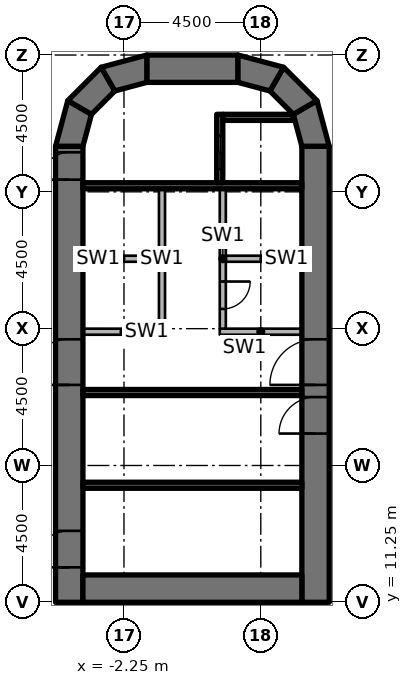
"""IFC4 building model, lengths in metres.
Left out: names, types, materials, properties, quantities, classifications, styles, units other than length and angle.
Written with IfcOpenShell. Run it as: python <this file> out.ifc"""

import sys

from ifc_helpers import new_model, si_unit, direction, frame, frame_2d, origin, place, context, subcontext, project, spatial, polyline, rectangle, outline, extrude, element, fill, save


model = new_model("IFC4")
c1 = context("Model", 3, precision=1e-05, world=origin(), true_north=direction((0.0, 1.0)))
c2 = subcontext(c1, "Body", "Model", "MODEL_VIEW")
j1 = project(units=[si_unit("LENGTHUNIT", "METRE"), si_unit("PLANEANGLEUNIT", "RADIAN")], contexts=[c1])
p1 = place(None, origin())
s1 = spatial("IfcSite", under=j1, at=p1, CompositionType="ELEMENT")
p2 = place(p1, origin())
s2 = spatial("IfcBuilding", under=s1, at=p2, CompositionType="ELEMENT")
p3 = place(p2, frame((0.0, 0.0, -4.0)))
s3 = spatial("IfcBuildingStorey", under=s2, at=p3, CompositionType="ELEMENT", Elevation=-4.0)
p4 = place(p3, frame((-4.05, 11.25, 0.0), z_axis=(0.0, 0.0, 1.0), x_axis=(0.0, 1.0, 0.0)))
e1 = element("IfcWall", 1, at=p4, inside=s3, PredefinedType="SHEAR", context=c2, shape_type="SweptSolid", body=[
    extrude(rectangle(XDim=15.0, YDim=0.9, at=frame_2d((7.5, 0.0))), origin(), (0.0, 0.0, 1.0), 4.0),
])
p5 = place(p4, frame((7.15, 0.0, 0.0)))
e2 = element("IfcOpeningElement", 2, at=p5, cuts=e1, PredefinedType="OPENING", context=c2, shape_type="SweptSolid", body=[
    extrude(rectangle(XDim=1.5, YDim=2.3, at=frame_2d((0.75, 1.15))), frame((0.0, 0.46, 0.0), z_axis=(0.0, -1.0, 0.0), x_axis=(1.0, 0.0, 0.0)), (0.0, 0.0, 1.0), 0.92),
])
p6 = place(p4, frame((13.9, 0.0, 0.0)))
e3 = element("IfcOpeningElement", 3, at=p6, cuts=e1, PredefinedType="OPENING", context=c2, shape_type="SweptSolid", body=[
    extrude(rectangle(XDim=0.9, YDim=2.1, at=frame_2d((0.45, 1.05))), frame((0.0, 0.46, 0.0), z_axis=(0.0, -1.0, 0.0), x_axis=(1.0, 0.0, 0.0)), (0.0, 0.0, 1.0), 0.92),
])
p7 = place(p4, frame((1.15, 0.0, 0.0)))
e4 = element("IfcOpeningElement", 4, at=p7, cuts=e1, PredefinedType="OPENING", context=c2, shape_type="SweptSolid", body=[
    extrude(rectangle(XDim=1.2, YDim=2.1, at=frame_2d((0.6, 1.05))), frame((0.0, 0.46, 0.0), z_axis=(0.0, -1.0, 0.0), x_axis=(1.0, 0.0, 0.0)), (0.0, 0.0, 1.0), 0.92),
])
p8 = place(p3, frame((4.05, 11.25, 0.0), z_axis=(0.0, 0.0, 1.0), x_axis=(0.0, 1.0, 0.0)))
e5 = element("IfcWall", 5, at=p8, inside=s3, PredefinedType="SHEAR", context=c2, shape_type="SweptSolid", body=[
    extrude(rectangle(XDim=15.0, YDim=0.9, at=frame_2d((7.5, 0.0))), origin(), (0.0, 0.0, 1.0), 4.0),
])
p9 = place(p8, frame((7.15, 0.0, 0.0)))
e6 = element("IfcOpeningElement", 6, at=p9, cuts=e5, PredefinedType="OPENING", context=c2, shape_type="SweptSolid", body=[
    extrude(rectangle(XDim=1.5, YDim=2.3, at=frame_2d((0.75, 1.15))), frame((0.0, 0.46, 0.0), z_axis=(0.0, -1.0, 0.0), x_axis=(1.0, 0.0, 0.0)), (0.0, 0.0, 1.0), 0.92),
])
p10 = place(p8, frame((5.55, 0.0, 0.0)))
e7 = element("IfcOpeningElement", 7, at=p10, cuts=e5, PredefinedType="OPENING", context=c2, shape_type="SweptSolid", body=[
    extrude(rectangle(XDim=1.2, YDim=2.1, at=frame_2d((0.6, 1.05))), frame((0.0, 0.46, 0.0), z_axis=(0.0, -1.0, 0.0), x_axis=(1.0, 0.0, 0.0)), (0.0, 0.0, 1.0), 0.92),
])
p11 = place(p3, frame((-3.6, 11.7, 0.0), z_axis=(0.0, 0.0, 1.0), x_axis=(1.0, 0.0, 0.0)))
e8 = element("IfcWall", 8, at=p11, inside=s3, PredefinedType="SHEAR", context=c2, shape_type="SweptSolid", body=[
    extrude(rectangle(XDim=7.2, YDim=0.9, at=frame_2d((3.6, 0.0))), origin(), (0.0, 0.0, 1.0), 4.0),
])
p12 = place(p3, frame((-1.5, 28.8, 0.0), z_axis=(0.0, 0.0, 1.0), x_axis=(1.0, 0.0, 0.0)))
e9 = element("IfcWall", 9, at=p12, inside=s3, PredefinedType="SHEAR", context=c2, shape_type="SweptSolid", body=[
    extrude(rectangle(XDim=3.0, YDim=0.9, at=frame_2d((1.5, 0.0))), origin(), (0.0, 0.0, 1.0), 4.0),
])
p13 = place(p3, origin())
e10 = element("IfcWall", 10, at=p13, inside=s3, PredefinedType="SHEAR", context=c2, shape_type="SweptSolid", body=[
    extrude(outline(polyline([(-4.5, 26.25), (-4.098, 27.75), (-3.319, 27.3), (-3.6, 26.25), (-4.5, 26.25)])), origin(), (0.0, 0.0, 1.0), 4.0),
])
p14 = place(p3, origin())
e11 = element("IfcWall", 11, at=p14, inside=s3, PredefinedType="SHEAR", context=c2, shape_type="SweptSolid", body=[
    extrude(outline(polyline([(-4.098, 27.75), (-3.0, 28.848), (-2.55, 28.069), (-3.319, 27.3), (-4.098, 27.75)])), origin(), (0.0, 0.0, 1.0), 4.0),
])
p15 = place(p3, origin())
e12 = element("IfcWall", 12, at=p15, inside=s3, PredefinedType="SHEAR", context=c2, shape_type="SweptSolid", body=[
    extrude(outline(polyline([(-3.0, 28.848), (-1.5, 29.25), (-1.5, 28.35), (-2.55, 28.069), (-3.0, 28.848)])), origin(), (0.0, 0.0, 1.0), 4.0),
])
p16 = place(p3, origin())
e13 = element("IfcWall", 13, at=p16, inside=s3, PredefinedType="SHEAR", context=c2, shape_type="SweptSolid", body=[
    extrude(outline(polyline([(4.5, 26.25), (4.098, 27.75), (3.319, 27.3), (3.6, 26.25), (4.5, 26.25)])), origin(), (0.0, 0.0, 1.0), 4.0),
])
p17 = place(p3, origin())
e14 = element("IfcWall", 14, at=p17, inside=s3, PredefinedType="SHEAR", context=c2, shape_type="SweptSolid", body=[
    extrude(outline(polyline([(4.098, 27.75), (3.0, 28.848), (2.55, 28.069), (3.319, 27.3), (4.098, 27.75)])), origin(), (0.0, 0.0, 1.0), 4.0),
])
p18 = place(p3, origin())
e15 = element("IfcWall", 15, at=p18, inside=s3, PredefinedType="SHEAR", context=c2, shape_type="SweptSolid", body=[
    extrude(outline(polyline([(3.0, 28.848), (1.5, 29.25), (1.5, 28.35), (2.55, 28.069), (3.0, 28.848)])), origin(), (0.0, 0.0, 1.0), 4.0),
])
p19 = place(p3, frame((-3.6, 24.95, 0.0), z_axis=(0.0, 0.0, 1.0), x_axis=(1.0, 0.0, 0.0)))
e16 = element("IfcWall", 16, at=p19, inside=s3, PredefinedType="SHEAR", context=c2, shape_type="SweptSolid", body=[
    extrude(rectangle(XDim=7.2, YDim=0.2, at=frame_2d((3.6, 0.0))), origin(), (0.0, 0.0, 1.0), 3.1),
])
p20 = place(p3, frame((0.9, 27.3, 0.0), z_axis=(0.0, 0.0, 1.0), x_axis=(0.0, -1.0, 0.0)))
e17 = element("IfcWall", 17, at=p20, inside=s3, PredefinedType="SHEAR", context=c2, shape_type="SweptSolid", body=[
    extrude(rectangle(XDim=2.25, YDim=0.2, at=frame_2d((1.125, 0.0))), origin(), (0.0, 0.0, 1.0), 3.1),
])
p21 = place(p20, frame((0.7, 0.0, 0.0)))
e18 = element("IfcOpeningElement", 18, at=p21, cuts=e17, PredefinedType="OPENING", context=c2, shape_type="SweptSolid", body=[
    extrude(rectangle(XDim=1.1, YDim=2.3, at=frame_2d((0.55, 1.15))), frame((0.0, 0.11, 0.0), z_axis=(0.0, -1.0, 0.0), x_axis=(1.0, 0.0, 0.0)), (0.0, 0.0, 1.0), 0.22),
])
p22 = place(p3, origin())
e19 = element("IfcWall", 19, at=p22, inside=s3, PredefinedType="SHEAR", context=c2, shape_type="SweptSolid", body=[
    extrude(outline(polyline([(1.0, 27.1), (3.341, 27.1), (3.291, 27.284), (3.275, 27.3), (1.0, 27.3), (1.0, 27.1)])), origin(), (0.0, 0.0, 1.0), 3.1),
])
for number, where, z_axis, x_axis in (
    (20, (-3.6, 18.15, 0.0), (0.0, 0.0, 1.0), (1.0, 0.0, 0.0)),
    (21, (-3.6, 15.1, 0.0), (0.0, 0.0, 1.0), (1.0, 0.0, 0.0)),
):
    element("IfcWall", number, at=place(p3, frame(where, z_axis=z_axis, x_axis=x_axis)), inside=s3, PredefinedType="SHEAR", context=c2, shape_type="SweptSolid", body=[
        extrude(rectangle(XDim=7.2, YDim=0.2, at=frame_2d((3.6, 0.0))), origin(), (0.0, 0.0, 1.0), 3.1),
    ])
p23 = place(p3, frame((-3.6, 20.15, 0.0), z_axis=(0.0, 0.0, 1.0), x_axis=(1.0, 0.0, 0.0)))
e22 = element("IfcWall", 22, at=p23, inside=s3, PredefinedType="PARTITIONING", context=c2, shape_type="SweptSolid", body=[
    extrude(rectangle(XDim=2.7, YDim=0.2, at=frame_2d((1.35, 0.0))), origin(), (0.0, 0.0, 1.0), 3.1),
])
p24 = place(p3, frame((-1.0, 24.85, 0.0), z_axis=(0.0, 0.0, 1.0), x_axis=(0.0, -1.0, 0.0)))
e23 = element("IfcWall", 23, at=p24, inside=s3, PredefinedType="PARTITIONING", context=c2, shape_type="SweptSolid", body=[
    extrude(rectangle(XDim=4.6, YDim=0.2, at=frame_2d((2.3, 0.0))), origin(), (0.0, 0.0, 1.0), 3.1),
])
p25 = place(p3, frame((0.9, 20.15, 0.0), z_axis=(0.0, 0.0, 1.0), x_axis=(1.0, 0.0, 0.0)))
e24 = element("IfcWall", 24, at=p25, inside=s3, PredefinedType="PARTITIONING", context=c2, shape_type="SweptSolid", body=[
    extrude(rectangle(XDim=2.7, YDim=0.2, at=frame_2d((1.35, 0.0))), origin(), (0.0, 0.0, 1.0), 3.1),
])
p26 = place(p3, frame((1.0, 24.85, 0.0), z_axis=(0.0, 0.0, 1.0), x_axis=(0.0, -1.0, 0.0)))
e25 = element("IfcWall", 25, at=p26, inside=s3, PredefinedType="PARTITIONING", context=c2, shape_type="SweptSolid", body=[
    extrude(rectangle(XDim=4.6, YDim=0.2, at=frame_2d((2.3, 0.0))), origin(), (0.0, 0.0, 1.0), 3.1),
])
p27 = place(p26, frame((3.05, 0.0, 0.0)))
e26 = element("IfcOpeningElement", 26, at=p27, cuts=e25, PredefinedType="OPENING", context=c2, shape_type="SweptSolid", body=[
    extrude(rectangle(XDim=0.9, YDim=2.1, at=frame_2d((0.45, 1.05))), frame((0.0, 0.11, 0.0), z_axis=(0.0, -1.0, 0.0), x_axis=(1.0, 0.0, 0.0)), (0.0, 0.0, 1.0), 0.22),
])
for number, where, z_axis, x_axis in (
    (27, (-3.6, 22.55, 0.0), (0.0, 0.0, 1.0), (1.0, 0.0, 0.0)),
    (28, (1.1, 22.55, 0.0), (0.0, 0.0, 1.0), (1.0, 0.0, 0.0)),
):
    element("IfcWall", number, at=place(p3, frame(where, z_axis=z_axis, x_axis=x_axis)), inside=s3, PredefinedType="PARTITIONING", context=c2, shape_type="SweptSolid", body=[
        extrude(rectangle(XDim=2.5, YDim=0.2, at=frame_2d((1.25, 0.0))), origin(), (0.0, 0.0, 1.0), 3.1),
    ])
p28 = place(p5, origin())
e29 = element("IfcDoor", 29, at=p28, inside=s3, OperationType="DOUBLE_DOOR_SINGLE_SWING", PredefinedType="DOOR", context=c2, shape_type="SweptSolid", body=[
    extrude(rectangle(XDim=1.5, YDim=2.3, at=frame_2d((0.75, 1.15))), frame((0.0, 0.025, 0.0), z_axis=(0.0, -1.0, 0.0), x_axis=(1.0, 0.0, 0.0)), (0.0, 0.0, 1.0), 0.05),
])
fill(e2, e29)
p29 = place(p9, origin())
e30 = element("IfcDoor", 30, at=p29, inside=s3, OperationType="DOUBLE_DOOR_SINGLE_SWING", PredefinedType="DOOR", context=c2, shape_type="SweptSolid", body=[
    extrude(rectangle(XDim=1.5, YDim=2.3, at=frame_2d((0.75, 1.15))), frame((0.0, 0.025, 0.0), z_axis=(0.0, -1.0, 0.0), x_axis=(1.0, 0.0, 0.0)), (0.0, 0.0, 1.0), 0.05),
])
fill(e6, e30)
p30 = place(p6, origin())
e31 = element("IfcDoor", 31, at=p30, inside=s3, OperationType="SINGLE_SWING_LEFT", PredefinedType="DOOR", context=c2, shape_type="SweptSolid", body=[
    extrude(rectangle(XDim=0.9, YDim=2.1, at=frame_2d((0.45, 1.05))), frame((0.0, 0.025, 0.0), z_axis=(0.0, -1.0, 0.0), x_axis=(1.0, 0.0, 0.0)), (0.0, 0.0, 1.0), 0.05),
])
fill(e3, e31)
p31 = place(p10, origin())
e32 = element("IfcDoor", 32, at=p31, inside=s3, OperationType="SINGLE_SWING_RIGHT", PredefinedType="DOOR", context=c2, shape_type="SweptSolid", body=[
    extrude(rectangle(XDim=1.2, YDim=2.1, at=frame_2d((0.6, 1.05))), frame((0.0, 0.025, 0.0), z_axis=(0.0, -1.0, 0.0), x_axis=(1.0, 0.0, 0.0)), (0.0, 0.0, 1.0), 0.05),
])
fill(e7, e32)
p32 = place(p7, origin())
e33 = element("IfcDoor", 33, at=p32, inside=s3, OperationType="SINGLE_SWING_RIGHT", PredefinedType="DOOR", context=c2, shape_type="SweptSolid", body=[
    extrude(rectangle(XDim=1.2, YDim=2.1, at=frame_2d((0.6, 1.05))), frame((0.0, 0.025, 0.0), z_axis=(0.0, -1.0, 0.0), x_axis=(1.0, 0.0, 0.0)), (0.0, 0.0, 1.0), 0.05),
])
fill(e4, e33)
p33 = place(p21, origin())
e34 = element("IfcDoor", 34, at=p33, inside=s3, OperationType="DOUBLE_DOOR_SLIDING", PredefinedType="DOOR", context=c2, shape_type="SweptSolid", body=[
    extrude(rectangle(XDim=1.1, YDim=2.3, at=frame_2d((0.55, 1.15))), frame((0.0, 0.025, 0.0), z_axis=(0.0, -1.0, 0.0), x_axis=(1.0, 0.0, 0.0)), (0.0, 0.0, 1.0), 0.05),
])
fill(e18, e34)
p34 = place(p27, origin())
e35 = element("IfcDoor", 35, at=p34, inside=s3, OperationType="SINGLE_SWING_RIGHT", PredefinedType="DOOR", context=c2, shape_type="SweptSolid", body=[
    extrude(rectangle(XDim=0.9, YDim=2.1, at=frame_2d((0.45, 1.05))), frame((0.0, 0.025, 0.0), z_axis=(0.0, -1.0, 0.0), x_axis=(1.0, 0.0, 0.0)), (0.0, 0.0, 1.0), 0.05),
])
fill(e26, e35)
save(model, sys.argv[1])
